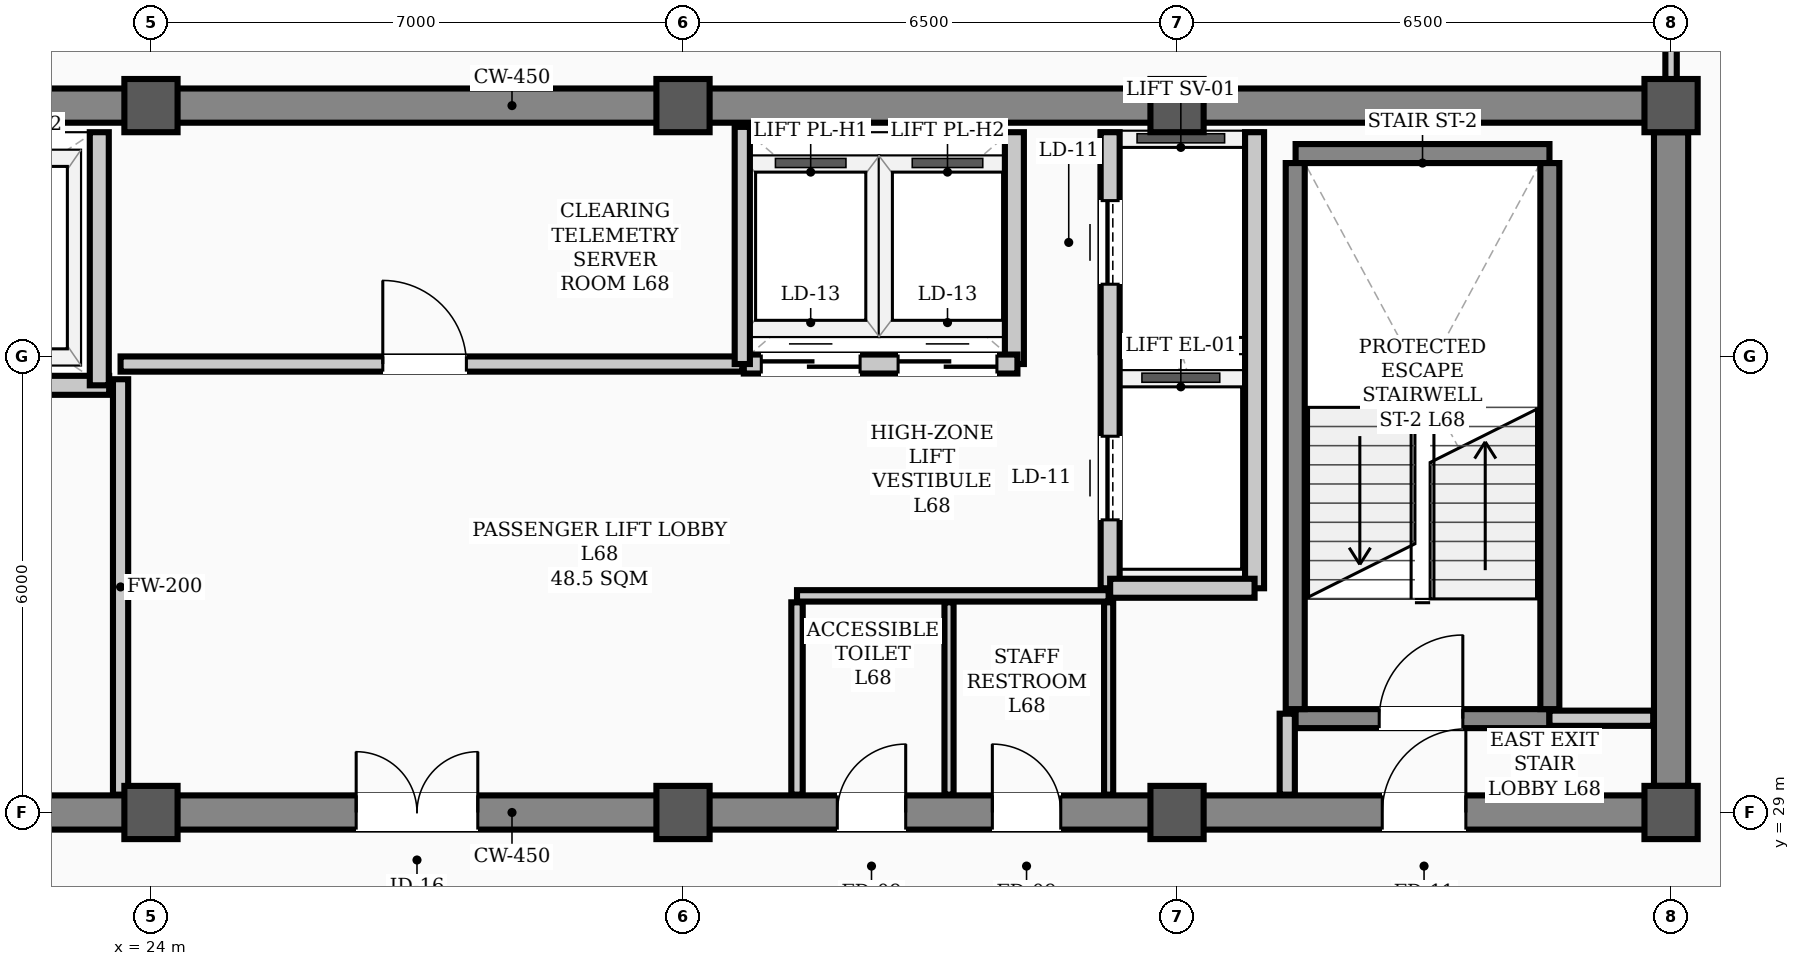
"""IFC4 building model, lengths in metres.
Left out: names, types, materials, properties, quantities, classifications, styles, units other than length and angle.
Written with IfcOpenShell. Run it as: python <this file> out.ifc"""

import sys

from ifc_helpers import new_model, si_unit, direction, frame, frame_2d, origin, origin_2d, place, context, subcontext, project, spatial, rectangle, hollow_rectangle, extrude, element, fill, save


model = new_model("IFC4")
c1 = context("Model", 3, precision=1e-05, world=origin(), true_north=direction((0.0, 1.0)))
c2 = subcontext(c1, "Body", "Model", "MODEL_VIEW")
j1 = project(units=[si_unit("LENGTHUNIT", "METRE"), si_unit("PLANEANGLEUNIT", "RADIAN")], contexts=[c1])
p1 = place(None, origin())
s1 = spatial("IfcSite", under=j1, at=p1, CompositionType="ELEMENT")
p2 = place(p1, origin())
s2 = spatial("IfcBuilding", under=s1, at=p2, CompositionType="ELEMENT")
p3 = place(p2, frame((0.0, 0.0, 273.5)))
s3 = spatial("IfcBuildingStorey", under=s2, at=p3, CompositionType="ELEMENT", Elevation=273.5)
for number, where, z_axis, x_axis in (
    (1, (24.0, 29.0, 0.0), (0.0, 0.0, 1.0), (1.0, 0.0, 0.0)),
    (2, (24.0, 38.3, 0.0), (0.0, 0.0, 1.0), (1.0, 0.0, 0.0)),
    (3, (31.0, 29.0, 0.0), (0.0, 0.0, 1.0), (1.0, 0.0, 0.0)),
    (4, (31.0, 38.3, 0.0), (0.0, 0.0, 1.0), (1.0, 0.0, 0.0)),
    (5, (37.5, 29.0, 0.0), (0.0, 0.0, 1.0), (1.0, 0.0, 0.0)),
    (6, (37.5, 38.3, 0.0), (0.0, 0.0, 1.0), (1.0, 0.0, 0.0)),
    (7, (44.0, 29.0, 0.0), (0.0, 0.0, 1.0), (1.0, 0.0, 0.0)),
    (8, (44.0, 38.3, 0.0), (0.0, 0.0, 1.0), (1.0, 0.0, 0.0)),
):
    element("IfcColumn", number, at=place(p3, frame(where, z_axis=z_axis, x_axis=x_axis)), inside=s3, PredefinedType="COLUMN", context=c2, shape_type="SweptSolid", body=[
        extrude(hollow_rectangle(XDim=0.7, YDim=0.7, WallThickness=0.028, InnerFilletRadius=0.014, OuterFilletRadius=0.042, at=origin_2d()), origin(), (0.0, 0.0, 1.0), 3.9),
    ])
p4 = place(p3, frame((13.5, 29.0, 0.0), z_axis=(0.0, 0.0, 1.0), x_axis=(1.0, 0.0, 0.0)))
e9 = element("IfcWall", 9, at=p4, inside=s3, PredefinedType="SHEAR", context=c2, shape_type="SweptSolid", body=[
    extrude(rectangle(XDim=30.5, YDim=0.45, at=frame_2d((15.25, 0.0))), origin(), (0.0, 0.0, 1.0), 3.72),
])
p5 = place(p4, frame((1.75, 0.0, 0.0)))
e10 = element("IfcOpeningElement", 10, at=p5, cuts=e9, PredefinedType="OPENING", context=c2, shape_type="SweptSolid", body=[
    extrude(rectangle(XDim=1.1, YDim=2.08, at=frame_2d((0.55, 1.04))), frame((0.0, 0.235, 0.0), z_axis=(0.0, -1.0, 0.0), x_axis=(1.0, 0.0, 0.0)), (0.0, 0.0, 1.0), 0.47),
])
p6 = place(p4, frame((26.7, 0.0, 0.0)))
e11 = element("IfcOpeningElement", 11, at=p6, cuts=e9, PredefinedType="OPENING", context=c2, shape_type="SweptSolid", body=[
    extrude(rectangle(XDim=1.1, YDim=2.08, at=frame_2d((0.55, 1.04))), frame((0.0, 0.235, 0.0), z_axis=(0.0, -1.0, 0.0), x_axis=(1.0, 0.0, 0.0)), (0.0, 0.0, 1.0), 0.47),
])
p7 = place(p4, frame((6.8, 0.0, 0.0)))
e12 = element("IfcOpeningElement", 12, at=p7, cuts=e9, PredefinedType="OPENING", context=c2, shape_type="SweptSolid", body=[
    extrude(rectangle(XDim=1.1, YDim=2.08, at=frame_2d((0.55, 1.04))), frame((0.0, 0.235, 0.0), z_axis=(0.0, -1.0, 0.0), x_axis=(1.0, 0.0, 0.0)), (0.0, 0.0, 1.0), 0.47),
])
p8 = place(p4, frame((13.2, 0.0, 0.0)))
e13 = element("IfcOpeningElement", 13, at=p8, cuts=e9, PredefinedType="OPENING", context=c2, shape_type="SweptSolid", body=[
    extrude(rectangle(XDim=1.6, YDim=2.08, at=frame_2d((0.8, 1.04))), frame((0.0, 0.235, 0.0), z_axis=(0.0, -1.0, 0.0), x_axis=(1.0, 0.0, 0.0)), (0.0, 0.0, 1.0), 0.47),
])
p9 = place(p4, frame((19.53, 0.0, 0.0)))
e14 = element("IfcOpeningElement", 14, at=p9, cuts=e9, PredefinedType="OPENING", context=c2, shape_type="SweptSolid", body=[
    extrude(rectangle(XDim=0.9, YDim=2.08, at=frame_2d((0.45, 1.04))), frame((0.0, 0.235, 0.0), z_axis=(0.0, -1.0, 0.0), x_axis=(1.0, 0.0, 0.0)), (0.0, 0.0, 1.0), 0.47),
])
p10 = place(p4, frame((21.57, 0.0, 0.0)))
e15 = element("IfcOpeningElement", 15, at=p10, cuts=e9, PredefinedType="OPENING", context=c2, shape_type="SweptSolid", body=[
    extrude(rectangle(XDim=0.9, YDim=2.08, at=frame_2d((0.45, 1.04))), frame((0.0, 0.235, 0.0), z_axis=(0.0, -1.0, 0.0), x_axis=(1.0, 0.0, 0.0)), (0.0, 0.0, 1.0), 0.47),
])
p11 = place(p3, frame((13.5, 38.3, 0.0), z_axis=(0.0, 0.0, 1.0), x_axis=(1.0, 0.0, 0.0)))
e16 = element("IfcWall", 16, at=p11, inside=s3, PredefinedType="SHEAR", context=c2, shape_type="SweptSolid", body=[
    extrude(rectangle(XDim=30.5, YDim=0.45, at=frame_2d((15.25, 0.0))), origin(), (0.0, 0.0, 1.0), 3.72),
])
p12 = place(p3, frame((44.0, 29.35, 0.0), z_axis=(0.0, 0.0, 1.0), x_axis=(0.0, 1.0, 0.0)))
e17 = element("IfcWall", 17, at=p12, inside=s3, PredefinedType="SHEAR", context=c2, shape_type="SweptSolid", body=[
    extrude(rectangle(XDim=8.6, YDim=0.45, at=frame_2d((4.3, 0.0))), origin(), (0.0, 0.0, 1.0), 3.72),
])
p13 = place(p3, frame((39.06, 30.235, 0.0), z_axis=(0.0, 0.0, 1.0), x_axis=(1.0, 0.0, 0.0)))
e18 = element("IfcWall", 18, at=p13, inside=s3, PredefinedType="STANDARD", context=c2, shape_type="SweptSolid", body=[
    extrude(rectangle(XDim=3.34, YDim=0.25, at=frame_2d((1.67, 0.0))), origin(), (0.0, 0.0, 1.0), 3.72),
])
p14 = place(p13, frame((1.1, 0.0, 0.0)))
e19 = element("IfcOpeningElement", 19, at=p14, cuts=e18, PredefinedType="OPENING", context=c2, shape_type="SweptSolid", body=[
    extrude(rectangle(XDim=1.1, YDim=2.08, at=frame_2d((0.55, 1.04))), frame((0.0, 0.135, 0.0), z_axis=(0.0, -1.0, 0.0), x_axis=(1.0, 0.0, 0.0)), (0.0, 0.0, 1.0), 0.27),
])
p15 = place(p3, frame((39.06, 37.669, 0.0), z_axis=(0.0, 0.0, 1.0), x_axis=(1.0, 0.0, 0.0)))
e20 = element("IfcWall", 20, at=p15, inside=s3, PredefinedType="STANDARD", context=c2, shape_type="SweptSolid", body=[
    extrude(rectangle(XDim=3.34, YDim=0.25, at=frame_2d((1.67, 0.0))), origin(), (0.0, 0.0, 1.0), 3.72),
])
for number, where, z_axis, x_axis in (
    (21, (39.055, 30.36, 0.0), (0.0, 0.0, 1.0), (0.0, 1.0, 0.0)),
    (22, (42.405, 30.36, 0.0), (0.0, 0.0, 1.0), (0.0, 1.0, 0.0)),
):
    element("IfcWall", number, at=place(p3, frame(where, z_axis=z_axis, x_axis=x_axis)), inside=s3, PredefinedType="STANDARD", context=c2, shape_type="SweptSolid", body=[
        extrude(rectangle(XDim=7.184, YDim=0.25, at=frame_2d((3.592, 0.0))), origin(), (0.0, 0.0, 1.0), 3.72),
    ])
p16 = place(p3, frame((18.1, 34.62, 0.0), z_axis=(0.0, 0.0, 1.0), x_axis=(1.0, 0.0, 0.0)))
e23 = element("IfcWall", 23, at=p16, inside=s3, PredefinedType="STANDARD", context=c2, shape_type="SweptSolid", body=[
    extrude(rectangle(XDim=5.35, YDim=0.25, at=frame_2d((2.675, 0.0))), origin(), (0.0, 0.0, 1.0), 3.72),
])
p17 = place(p16, frame((0.85, 0.0, 0.0)))
e24 = element("IfcOpeningElement", 24, at=p17, cuts=e23, PredefinedType="OPENING", context=c2, shape_type="SweptSolid", body=[
    extrude(rectangle(XDim=1.1, YDim=2.08, at=frame_2d((0.55, 1.04))), frame((0.0, 0.135, 0.0), z_axis=(0.0, -1.0, 0.0), x_axis=(1.0, 0.0, 0.0)), (0.0, 0.0, 1.0), 0.27),
])
p18 = place(p16, frame((3.45, 0.0, 0.0)))
e25 = element("IfcOpeningElement", 25, at=p18, cuts=e23, PredefinedType="OPENING", context=c2, shape_type="SweptSolid", body=[
    extrude(rectangle(XDim=1.1, YDim=2.08, at=frame_2d((0.55, 1.04))), frame((0.0, 0.135, 0.0), z_axis=(0.0, -1.0, 0.0), x_axis=(1.0, 0.0, 0.0)), (0.0, 0.0, 1.0), 0.27),
])
p19 = place(p3, frame((36.62, 31.95, 0.0), z_axis=(0.0, 0.0, 1.0), x_axis=(0.0, 1.0, 0.0)))
e26 = element("IfcWall", 26, at=p19, inside=s3, PredefinedType="STANDARD", context=c2, shape_type="SweptSolid", body=[
    extrude(rectangle(XDim=6.0, YDim=0.25, at=frame_2d((3.0, 0.0))), origin(), (0.0, 0.0, 1.0), 3.4),
])
p20 = place(p19, frame((0.9, 0.0, 0.0)))
e27 = element("IfcOpeningElement", 27, at=p20, cuts=e26, PredefinedType="OPENING", context=c2, shape_type="SweptSolid", body=[
    extrude(rectangle(XDim=1.1, YDim=2.08, at=frame_2d((0.55, 1.04))), frame((0.0, 0.135, 0.0), z_axis=(0.0, -1.0, 0.0), x_axis=(1.0, 0.0, 0.0)), (0.0, 0.0, 1.0), 0.27),
])
p21 = place(p19, frame((4.0, 0.0, 0.0)))
e28 = element("IfcOpeningElement", 28, at=p21, cuts=e26, PredefinedType="OPENING", context=c2, shape_type="SweptSolid", body=[
    extrude(rectangle(XDim=1.1, YDim=2.08, at=frame_2d((0.55, 1.04))), frame((0.0, 0.135, 0.0), z_axis=(0.0, -1.0, 0.0), x_axis=(1.0, 0.0, 0.0)), (0.0, 0.0, 1.0), 0.27),
])
p22 = place(p3, frame((38.52, 31.95, 0.0), z_axis=(0.0, 0.0, 1.0), x_axis=(0.0, 1.0, 0.0)))
e29 = element("IfcWall", 29, at=p22, inside=s3, PredefinedType="STANDARD", context=c2, shape_type="SweptSolid", body=[
    extrude(rectangle(XDim=6.0, YDim=0.25, at=frame_2d((3.0, 0.0))), origin(), (0.0, 0.0, 1.0), 3.48),
])
p23 = place(p3, frame((36.62, 31.95, 0.0), z_axis=(0.0, 0.0, 1.0), x_axis=(1.0, 0.0, 0.0)))
e30 = element("IfcWall", 30, at=p23, inside=s3, PredefinedType="STANDARD", context=c2, shape_type="SweptSolid", body=[
    extrude(rectangle(XDim=1.9, YDim=0.25, at=frame_2d((0.95, 0.0))), origin(), (0.0, 0.0, 1.0), 3.48),
])
p24 = place(p3, frame((23.32, 34.62, 0.0), z_axis=(0.0, 0.0, 1.0), x_axis=(0.0, 1.0, 0.0)))
e31 = element("IfcWall", 31, at=p24, inside=s3, PredefinedType="STANDARD", context=c2, shape_type="SweptSolid", body=[
    extrude(rectangle(XDim=3.33, YDim=0.25, at=frame_2d((1.665, 0.0))), origin(), (0.0, 0.0, 1.0), 3.4),
])
p25 = place(p3, frame((35.36, 34.9, 0.0), z_axis=(0.0, 0.0, 1.0), x_axis=(0.0, 1.0, 0.0)))
e32 = element("IfcWall", 32, at=p25, inside=s3, PredefinedType="STANDARD", context=c2, shape_type="SweptSolid", body=[
    extrude(rectangle(XDim=3.05, YDim=0.25, at=frame_2d((1.525, 0.0))), origin(), (0.0, 0.0, 1.0), 3.4),
])
p26 = place(p3, frame((31.8, 34.9, 0.0), z_axis=(0.0, 0.0, 1.0), x_axis=(1.0, 0.0, 0.0)))
e33 = element("IfcWall", 33, at=p26, inside=s3, PredefinedType="STANDARD", context=c2, shape_type="SweptSolid", body=[
    extrude(rectangle(XDim=3.6, YDim=0.25, at=frame_2d((1.8, 0.0))), origin(), (0.0, 0.0, 1.0), 3.72),
])
p27 = place(p26, frame((0.23, 0.0, 0.0)))
e34 = element("IfcOpeningElement", 34, at=p27, cuts=e33, PredefinedType="OPENING", context=c2, shape_type="SweptSolid", body=[
    extrude(rectangle(XDim=1.3, YDim=2.08, at=frame_2d((0.65, 1.04))), frame((0.0, 0.135, 0.0), z_axis=(0.0, -1.0, 0.0), x_axis=(1.0, 0.0, 0.0)), (0.0, 0.0, 1.0), 0.27),
])
p28 = place(p26, frame((2.03, 0.0, 0.0)))
e35 = element("IfcOpeningElement", 35, at=p28, cuts=e33, PredefinedType="OPENING", context=c2, shape_type="SweptSolid", body=[
    extrude(rectangle(XDim=1.3, YDim=2.08, at=frame_2d((0.65, 1.04))), frame((0.0, 0.135, 0.0), z_axis=(0.0, -1.0, 0.0), x_axis=(1.0, 0.0, 0.0)), (0.0, 0.0, 1.0), 0.27),
])
p29 = place(p3, frame((42.4, 30.24, 0.0), z_axis=(0.0, 0.0, 1.0), x_axis=(1.0, 0.0, 0.0)))
e36 = element("IfcWall", 36, at=p29, inside=s3, PredefinedType="STANDARD", context=c2, shape_type="SweptSolid", body=[
    extrude(rectangle(XDim=1.365, YDim=0.2, at=frame_2d((0.683, 0.0))), origin(), (0.0, 0.0, 1.0), 3.72),
])
p30 = place(p3, frame((23.6, 34.9, 0.0), z_axis=(0.0, 0.0, 1.0), x_axis=(1.0, 0.0, 0.0)))
e37 = element("IfcWall", 37, at=p30, inside=s3, PredefinedType="STANDARD", context=c2, shape_type="SweptSolid", body=[
    extrude(rectangle(XDim=8.18, YDim=0.2, at=frame_2d((4.09, 0.0))), origin(), (0.0, 0.0, 1.0), 3.72),
])
p31 = place(p30, frame((3.45, 0.0, 0.0)))
e38 = element("IfcOpeningElement", 38, at=p31, cuts=e37, PredefinedType="OPENING", context=c2, shape_type="SweptSolid", body=[
    extrude(rectangle(XDim=1.1, YDim=2.08, at=frame_2d((0.55, 1.04))), frame((0.0, 0.11, 0.0), z_axis=(0.0, -1.0, 0.0), x_axis=(1.0, 0.0, 0.0)), (0.0, 0.0, 1.0), 0.22),
])
p32 = place(p3, frame((32.5, 31.85, 0.0), z_axis=(0.0, 0.0, 1.0), x_axis=(1.0, 0.0, 0.0)))
e39 = element("IfcWall", 39, at=p32, inside=s3, PredefinedType="PARTITIONING", context=c2, shape_type="SweptSolid", body=[
    extrude(rectangle(XDim=4.1, YDim=0.15, at=frame_2d((2.05, 0.0))), origin(), (0.0, 0.0, 1.0), 3.72),
])
p33 = place(p3, frame((38.95, 29.235, 0.0), z_axis=(0.0, 0.0, 1.0), x_axis=(0.0, 1.0, 0.0)))
e40 = element("IfcWall", 40, at=p33, inside=s3, PredefinedType="STANDARD", context=c2, shape_type="SweptSolid", body=[
    extrude(rectangle(XDim=1.065, YDim=0.2, at=frame_2d((0.532, 0.0))), origin(), (0.0, 0.0, 1.0), 3.72),
])
p34 = place(p3, frame((23.6, 29.235, 0.0), z_axis=(0.0, 0.0, 1.0), x_axis=(0.0, 1.0, 0.0)))
e41 = element("IfcWall", 41, at=p34, inside=s3, PredefinedType="STANDARD", context=c2, shape_type="SweptSolid", body=[
    extrude(rectangle(XDim=5.465, YDim=0.2, at=frame_2d((2.732, 0.0))), origin(), (0.0, 0.0, 1.0), 3.2),
])
p35 = place(p3, frame((32.5, 29.235, 0.0), z_axis=(0.0, 0.0, 1.0), x_axis=(0.0, 1.0, 0.0)))
e42 = element("IfcWall", 42, at=p35, inside=s3, PredefinedType="PARTITIONING", context=c2, shape_type="SweptSolid", body=[
    extrude(rectangle(XDim=2.53, YDim=0.15, at=frame_2d((1.265, 0.0))), origin(), (0.0, 0.0, 1.0), 3.4),
])
for number, where, z_axis, x_axis in (
    (43, (36.6, 29.235, 0.0), (0.0, 0.0, 1.0), (0.0, 1.0, 0.0)),
    (44, (34.5, 29.235, 0.0), (0.0, 0.0, 1.0), (0.0, 1.0, 0.0)),
):
    element("IfcWall", number, at=place(p3, frame(where, z_axis=z_axis, x_axis=x_axis)), inside=s3, PredefinedType="PARTITIONING", context=c2, shape_type="SweptSolid", body=[
        extrude(rectangle(XDim=2.53, YDim=0.12, at=frame_2d((1.265, 0.0))), origin(), (0.0, 0.0, 1.0), 3.4),
    ])
p36 = place(p3, frame((44.0, 38.535, 0.0), z_axis=(0.0, 0.0, 1.0), x_axis=(0.0, 1.0, 0.0)))
e45 = element("IfcWall", 45, at=p36, inside=s3, PredefinedType="PARTITIONING", context=c2, shape_type="SweptSolid", body=[
    extrude(rectangle(XDim=3.205, YDim=0.15, at=frame_2d((1.603, 0.0))), origin(), (0.0, 0.0, 1.0), 2.3),
])
p37 = place(p3, frame((31.78, 34.9, 0.0), z_axis=(0.0, 0.0, 1.0), x_axis=(0.0, 1.0, 0.0)))
e46 = element("IfcWall", 46, at=p37, inside=s3, PredefinedType="STANDARD", context=c2, shape_type="SweptSolid", body=[
    extrude(rectangle(XDim=3.12, YDim=0.2, at=frame_2d((1.56, 0.0))), origin(), (0.0, 0.0, 1.0), 3.4),
])
p38 = place(p14, origin())
e47 = element("IfcDoor", 47, at=p38, inside=s3, OperationType="SINGLE_SWING_RIGHT", PredefinedType="DOOR", context=c2, shape_type="SweptSolid", body=[
    extrude(rectangle(XDim=1.1, YDim=2.08, at=frame_2d((0.55, 1.04))), frame((0.0, 0.025, 0.0), z_axis=(0.0, -1.0, 0.0), x_axis=(1.0, 0.0, 0.0)), (0.0, 0.0, 1.0), 0.05),
])
fill(e19, e47)
p39 = place(p6, origin())
e48 = element("IfcDoor", 48, at=p39, inside=s3, OperationType="SINGLE_SWING_RIGHT", PredefinedType="DOOR", context=c2, shape_type="SweptSolid", body=[
    extrude(rectangle(XDim=1.1, YDim=2.08, at=frame_2d((0.55, 1.04))), frame((0.0, 0.025, 0.0), z_axis=(0.0, -1.0, 0.0), x_axis=(1.0, 0.0, 0.0)), (0.0, 0.0, 1.0), 0.05),
])
fill(e11, e48)
p40 = place(p8, origin())
e49 = element("IfcDoor", 49, at=p40, inside=s3, OperationType="DOUBLE_DOOR_SINGLE_SWING", PredefinedType="DOOR", context=c2, shape_type="SweptSolid", body=[
    extrude(rectangle(XDim=1.6, YDim=2.08, at=frame_2d((0.8, 1.04))), frame((0.0, 0.025, 0.0), z_axis=(0.0, -1.0, 0.0), x_axis=(1.0, 0.0, 0.0)), (0.0, 0.0, 1.0), 0.05),
])
fill(e13, e49)
p41 = place(p31, origin())
e50 = element("IfcDoor", 50, at=p41, inside=s3, OperationType="SINGLE_SWING_LEFT", PredefinedType="DOOR", context=c2, shape_type="SweptSolid", body=[
    extrude(rectangle(XDim=1.1, YDim=2.08, at=frame_2d((0.55, 1.04))), frame((0.0, 0.025, 0.0), z_axis=(0.0, -1.0, 0.0), x_axis=(1.0, 0.0, 0.0)), (0.0, 0.0, 1.0), 0.05),
])
fill(e38, e50)
p42 = place(p9, origin())
e51 = element("IfcDoor", 51, at=p42, inside=s3, OperationType="SINGLE_SWING_RIGHT", PredefinedType="DOOR", context=c2, shape_type="SweptSolid", body=[
    extrude(rectangle(XDim=0.9, YDim=2.08, at=frame_2d((0.45, 1.04))), frame((0.0, 0.025, 0.0), z_axis=(0.0, -1.0, 0.0), x_axis=(1.0, 0.0, 0.0)), (0.0, 0.0, 1.0), 0.05),
])
fill(e14, e51)
p43 = place(p10, origin())
e52 = element("IfcDoor", 52, at=p43, inside=s3, OperationType="SINGLE_SWING_LEFT", PredefinedType="DOOR", context=c2, shape_type="SweptSolid", body=[
    extrude(rectangle(XDim=0.9, YDim=2.08, at=frame_2d((0.45, 1.04))), frame((0.0, 0.025, 0.0), z_axis=(0.0, -1.0, 0.0), x_axis=(1.0, 0.0, 0.0)), (0.0, 0.0, 1.0), 0.05),
])
fill(e15, e52)
p44 = place(p20, origin())
e53 = element("IfcDoor", 53, at=p44, inside=s3, OperationType="SLIDING_TO_LEFT", PredefinedType="DOOR", context=c2, shape_type="SweptSolid", body=[
    extrude(rectangle(XDim=1.1, YDim=2.08, at=frame_2d((0.55, 1.04))), frame((0.0, 0.025, 0.0), z_axis=(0.0, -1.0, 0.0), x_axis=(1.0, 0.0, 0.0)), (0.0, 0.0, 1.0), 0.05),
])
fill(e27, e53)
p45 = place(p21, origin())
e54 = element("IfcDoor", 54, at=p45, inside=s3, OperationType="SLIDING_TO_LEFT", PredefinedType="DOOR", context=c2, shape_type="SweptSolid", body=[
    extrude(rectangle(XDim=1.1, YDim=2.08, at=frame_2d((0.55, 1.04))), frame((0.0, 0.025, 0.0), z_axis=(0.0, -1.0, 0.0), x_axis=(1.0, 0.0, 0.0)), (0.0, 0.0, 1.0), 0.05),
])
fill(e28, e54)
p46 = place(p27, origin())
e55 = element("IfcDoor", 55, at=p46, inside=s3, OperationType="DOUBLE_DOOR_SLIDING", PredefinedType="DOOR", context=c2, shape_type="SweptSolid", body=[
    extrude(rectangle(XDim=1.3, YDim=2.08, at=frame_2d((0.65, 1.04))), frame((0.0, 0.025, 0.0), z_axis=(0.0, -1.0, 0.0), x_axis=(1.0, 0.0, 0.0)), (0.0, 0.0, 1.0), 0.05),
])
fill(e34, e55)
p47 = place(p28, origin())
e56 = element("IfcDoor", 56, at=p47, inside=s3, OperationType="DOUBLE_DOOR_SLIDING", PredefinedType="DOOR", context=c2, shape_type="SweptSolid", body=[
    extrude(rectangle(XDim=1.3, YDim=2.08, at=frame_2d((0.65, 1.04))), frame((0.0, 0.025, 0.0), z_axis=(0.0, -1.0, 0.0), x_axis=(1.0, 0.0, 0.0)), (0.0, 0.0, 1.0), 0.05),
])
fill(e35, e56)
save(model, sys.argv[1])
